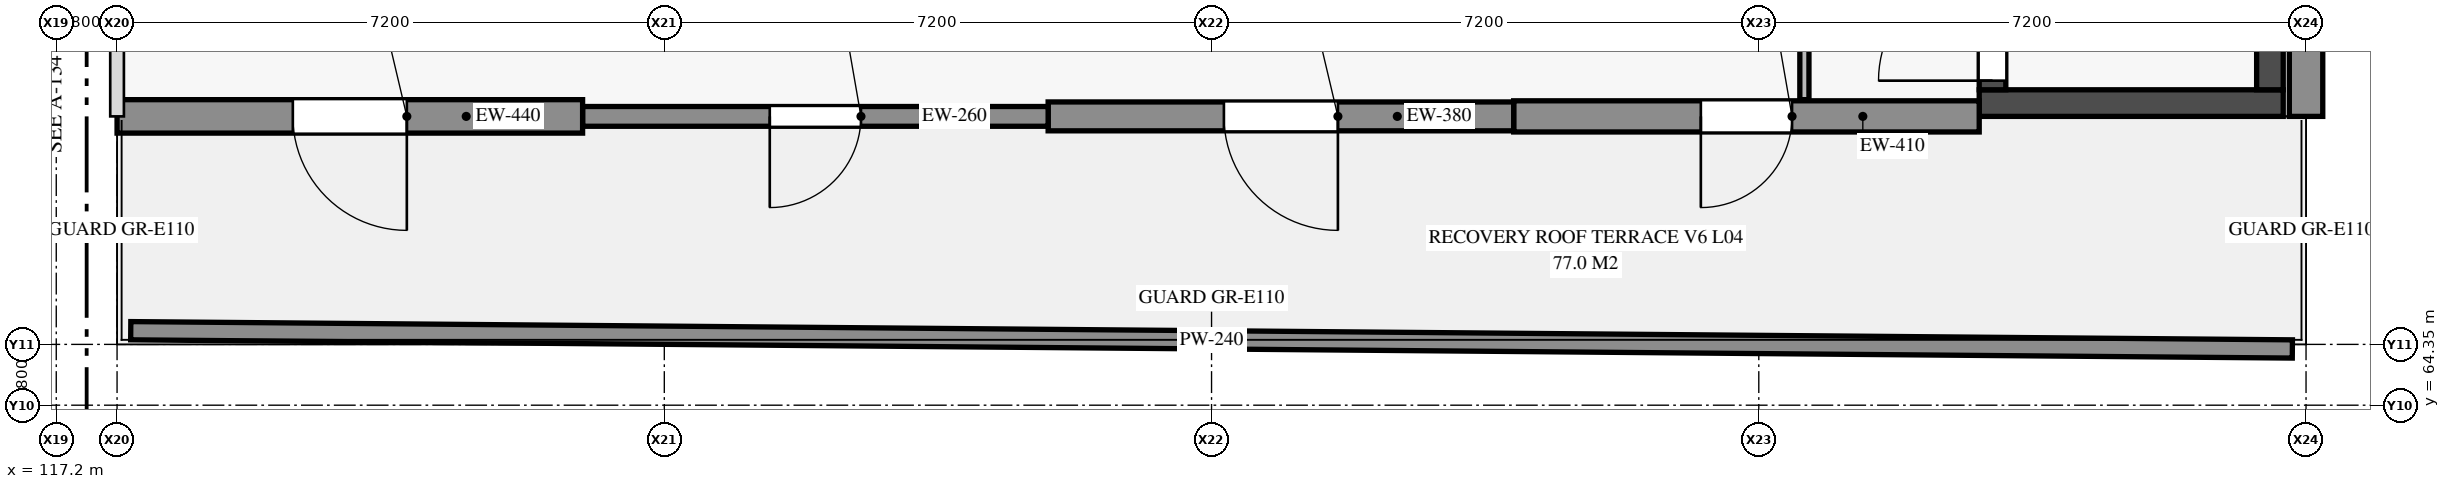
"""IFC4 building model, lengths in metres.
Left out: names, types, materials, properties, quantities, classifications, styles, units other than length and angle.
Written with IfcOpenShell. Run it as: python <this file> out.ifc"""

import sys

from ifc_helpers import new_model, si_unit, direction, frame, frame_2d, origin, place, context, subcontext, project, spatial, rectangle, extrude, element, fill, save


model = new_model("IFC4")
c1 = context("Model", 3, precision=1e-05, world=origin(), true_north=direction((0.0, 1.0)))
c2 = subcontext(c1, "Body", "Model", "MODEL_VIEW")
j1 = project(units=[si_unit("LENGTHUNIT", "METRE"), si_unit("PLANEANGLEUNIT", "RADIAN")], contexts=[c1])
p1 = place(None, origin())
s1 = spatial("IfcSite", under=j1, at=p1, CompositionType="ELEMENT")
p2 = place(p1, origin())
s2 = spatial("IfcBuilding", under=s1, at=p2, CompositionType="ELEMENT")
p3 = place(p2, frame((0.0, 0.0, 17.4)))
s3 = spatial("IfcBuildingStorey", under=s2, at=p3, CompositionType="ELEMENT", Elevation=17.4)
p4 = place(p3, frame((142.5, 68.325, 0.0), z_axis=(0.0, 0.0, 1.0), x_axis=(1.0, 0.0, 0.0)))
e1 = element("IfcWall", 1, at=p4, inside=s3, PredefinedType="SHEAR", context=c2, shape_type="SweptSolid", body=[
    extrude(rectangle(XDim=4.0, YDim=0.35, at=frame_2d((2.0, 0.0))), origin(), (0.0, 0.0, 1.0), 4.2),
])
p5 = place(p3, frame((142.675, 68.5, 0.0), z_axis=(0.0, 0.0, 1.0), x_axis=(0.0, 1.0, 0.0)))
e2 = element("IfcWall", 2, at=p5, inside=s3, PredefinedType="SHEAR", context=c2, shape_type="SweptSolid", body=[
    extrude(rectangle(XDim=7.3, YDim=0.35, at=frame_2d((3.65, 0.0))), origin(), (0.0, 0.0, 1.0), 4.2),
])
p6 = place(p5, frame((0.12, 0.0, 0.0)))
e3 = element("IfcOpeningElement", 3, at=p6, cuts=e2, PredefinedType="OPENING", context=c2, shape_type="SweptSolid", body=[
    extrude(rectangle(XDim=1.5, YDim=2.15, at=frame_2d((0.75, 1.075))), frame((0.0, 0.185, 0.0), z_axis=(0.0, -1.0, 0.0), x_axis=(1.0, 0.0, 0.0)), (0.0, 0.0, 1.0), 0.37),
])
p7 = place(p3, frame((146.325, 68.5, 0.0), z_axis=(0.0, 0.0, 1.0), x_axis=(0.0, 1.0, 0.0)))
e4 = element("IfcWall", 4, at=p7, inside=s3, PredefinedType="SHEAR", context=c2, shape_type="SweptSolid", body=[
    extrude(rectangle(XDim=7.3, YDim=0.35, at=frame_2d((3.65, 0.0))), origin(), (0.0, 0.0, 1.0), 4.2),
])
p8 = place(p3, frame((146.8, 72.0, 0.0), z_axis=(0.0, 0.0, 1.0), x_axis=(0.0, -1.0, 0.0)))
e5 = element("IfcWall", 5, at=p8, inside=s3, PredefinedType="USERDEFINED", context=c2, shape_type="SweptSolid", body=[
    extrude(rectangle(XDim=3.85, YDim=0.44, at=frame_2d((1.925, 0.0))), origin(), (0.0, 0.0, 1.0), 3.38),
])
p9 = place(p8, frame((1.125, 0.0, 0.9)))
e6 = element("IfcOpeningElement", 6, at=p9, cuts=e5, PredefinedType="OPENING", context=c2, shape_type="SweptSolid", body=[
    extrude(rectangle(XDim=1.6, YDim=1.8, at=frame_2d((0.8, 0.9))), frame((0.0, 0.23, 0.0), z_axis=(0.0, -1.0, 0.0), x_axis=(1.0, 0.0, 0.0)), (0.0, 0.0, 1.0), 0.46),
])
p10 = place(p3, frame((142.5, 68.15, 0.0), z_axis=(0.0, 0.0, 1.0), x_axis=(-1.0, 0.0, 0.0)))
e7 = element("IfcWall", 7, at=p10, inside=s3, PredefinedType="USERDEFINED", context=c2, shape_type="SweptSolid", body=[
    extrude(rectangle(XDim=6.125, YDim=0.41, at=frame_2d((3.062, 0.0))), origin(), (0.0, 0.0, 1.0), 3.38),
])
p11 = place(p10, frame((2.462, 0.0, 0.0)))
e8 = element("IfcOpeningElement", 8, at=p11, cuts=e7, PredefinedType="OPENING", context=c2, shape_type="SweptSolid", body=[
    extrude(rectangle(XDim=1.2, YDim=2.2, at=frame_2d((0.6, 1.1))), frame((0.0, 0.215, 0.0), z_axis=(0.0, -1.0, 0.0), x_axis=(1.0, 0.0, 0.0)), (0.0, 0.0, 1.0), 0.43),
])
p12 = place(p3, frame((136.375, 68.15, 0.0), z_axis=(0.0, 0.0, 1.0), x_axis=(-1.0, 0.0, 0.0)))
e9 = element("IfcWall", 9, at=p12, inside=s3, PredefinedType="USERDEFINED", context=c2, shape_type="SweptSolid", body=[
    extrude(rectangle(XDim=6.125, YDim=0.38, at=frame_2d((3.062, 0.0))), origin(), (0.0, 0.0, 1.0), 3.38),
])
p13 = place(p12, frame((2.312, 0.0, 0.0)))
e10 = element("IfcOpeningElement", 10, at=p13, cuts=e9, PredefinedType="OPENING", context=c2, shape_type="SweptSolid", body=[
    extrude(rectangle(XDim=1.5, YDim=2.2, at=frame_2d((0.75, 1.1))), frame((0.0, 0.2, 0.0), z_axis=(0.0, -1.0, 0.0), x_axis=(1.0, 0.0, 0.0)), (0.0, 0.0, 1.0), 0.4),
])
p14 = place(p3, frame((130.25, 68.15, 0.0), z_axis=(0.0, 0.0, 1.0), x_axis=(-1.0, 0.0, 0.0)))
e11 = element("IfcWall", 11, at=p14, inside=s3, PredefinedType="SOLIDWALL", context=c2, shape_type="SweptSolid", body=[
    extrude(rectangle(XDim=6.125, YDim=0.26, at=frame_2d((3.062, 0.0))), origin(), (0.0, 0.0, 1.0), 3.38),
])
p15 = place(p14, frame((2.462, 0.0, 0.0)))
e12 = element("IfcOpeningElement", 12, at=p15, cuts=e11, PredefinedType="OPENING", context=c2, shape_type="SweptSolid", body=[
    extrude(rectangle(XDim=1.2, YDim=2.2, at=frame_2d((0.6, 1.1))), frame((0.0, 0.14, 0.0), z_axis=(0.0, -1.0, 0.0), x_axis=(1.0, 0.0, 0.0)), (0.0, 0.0, 1.0), 0.28),
])
p16 = place(p3, frame((124.125, 68.15, 0.0), z_axis=(0.0, 0.0, 1.0), x_axis=(-1.0, 0.0, 0.0)))
e13 = element("IfcWall", 13, at=p16, inside=s3, PredefinedType="USERDEFINED", context=c2, shape_type="SweptSolid", body=[
    extrude(rectangle(XDim=6.125, YDim=0.44, at=frame_2d((3.062, 0.0))), origin(), (0.0, 0.0, 1.0), 3.38),
])
p17 = place(p16, frame((2.312, 0.0, 0.0)))
e14 = element("IfcOpeningElement", 14, at=p17, cuts=e13, PredefinedType="OPENING", context=c2, shape_type="SweptSolid", body=[
    extrude(rectangle(XDim=1.5, YDim=2.2, at=frame_2d((0.75, 1.1))), frame((0.0, 0.23, 0.0), z_axis=(0.0, -1.0, 0.0), x_axis=(1.0, 0.0, 0.0)), (0.0, 0.0, 1.0), 0.46),
])
p18 = place(p3, frame((118.18, 65.33, 0.0), z_axis=(0.0, 0.0, 1.0), x_axis=(0.999964398434, -0.008438119714, 0.0)))
e15 = element("IfcWall", 15, at=p18, inside=s3, PredefinedType="PARAPET", context=c2, shape_type="SweptSolid", body=[
    extrude(rectangle(XDim=28.441, YDim=0.24, at=frame_2d((14.221, 0.0))), origin(), (0.0, 0.0, 1.0), 1.12),
])
p19 = place(p3, frame((140.2, 68.37, 0.0), z_axis=(0.0, 0.0, 1.0), x_axis=(0.0, 1.0, 0.0)))
e16 = element("IfcWall", 16, at=p19, inside=s3, PredefinedType="PARTITIONING", context=c2, shape_type="SweptSolid", body=[
    extrude(rectangle(XDim=1.18, YDim=0.12, at=frame_2d((0.59, 0.0))), origin(), (0.0, 0.0, 1.0), 3.95),
])
p20 = place(p11, origin())
e17 = element("IfcDoor", 17, at=p20, inside=s3, OperationType="SINGLE_SWING_RIGHT", PredefinedType="DOOR", context=c2, shape_type="SweptSolid", body=[
    extrude(rectangle(XDim=1.2, YDim=2.2, at=frame_2d((0.6, 1.1))), frame((0.0, 0.025, 0.0), z_axis=(0.0, -1.0, 0.0), x_axis=(1.0, 0.0, 0.0)), (0.0, 0.0, 1.0), 0.05),
])
fill(e8, e17)
p21 = place(p13, origin())
e18 = element("IfcDoor", 18, at=p21, inside=s3, OperationType="SINGLE_SWING_LEFT", PredefinedType="DOOR", context=c2, shape_type="SweptSolid", body=[
    extrude(rectangle(XDim=1.5, YDim=2.2, at=frame_2d((0.75, 1.1))), frame((0.0, 0.025, 0.0), z_axis=(0.0, -1.0, 0.0), x_axis=(1.0, 0.0, 0.0)), (0.0, 0.0, 1.0), 0.05),
])
fill(e10, e18)
p22 = place(p15, origin())
e19 = element("IfcDoor", 19, at=p22, inside=s3, OperationType="SINGLE_SWING_RIGHT", PredefinedType="DOOR", context=c2, shape_type="SweptSolid", body=[
    extrude(rectangle(XDim=1.2, YDim=2.2, at=frame_2d((0.6, 1.1))), frame((0.0, 0.025, 0.0), z_axis=(0.0, -1.0, 0.0), x_axis=(1.0, 0.0, 0.0)), (0.0, 0.0, 1.0), 0.05),
])
fill(e12, e19)
p23 = place(p17, origin())
e20 = element("IfcDoor", 20, at=p23, inside=s3, OperationType="SINGLE_SWING_LEFT", PredefinedType="DOOR", context=c2, shape_type="SweptSolid", body=[
    extrude(rectangle(XDim=1.5, YDim=2.2, at=frame_2d((0.75, 1.1))), frame((0.0, 0.025, 0.0), z_axis=(0.0, -1.0, 0.0), x_axis=(1.0, 0.0, 0.0)), (0.0, 0.0, 1.0), 0.05),
])
fill(e14, e20)
p24 = place(p6, origin())
e21 = element("IfcDoor", 21, at=p24, inside=s3, OperationType="SINGLE_SWING_LEFT", PredefinedType="DOOR", context=c2, shape_type="SweptSolid", body=[
    extrude(rectangle(XDim=1.5, YDim=2.15, at=frame_2d((0.75, 1.075))), frame((0.0, 0.025, 0.0), z_axis=(0.0, -1.0, 0.0), x_axis=(1.0, 0.0, 0.0)), (0.0, 0.0, 1.0), 0.05),
])
fill(e3, e21)
save(model, sys.argv[1])
